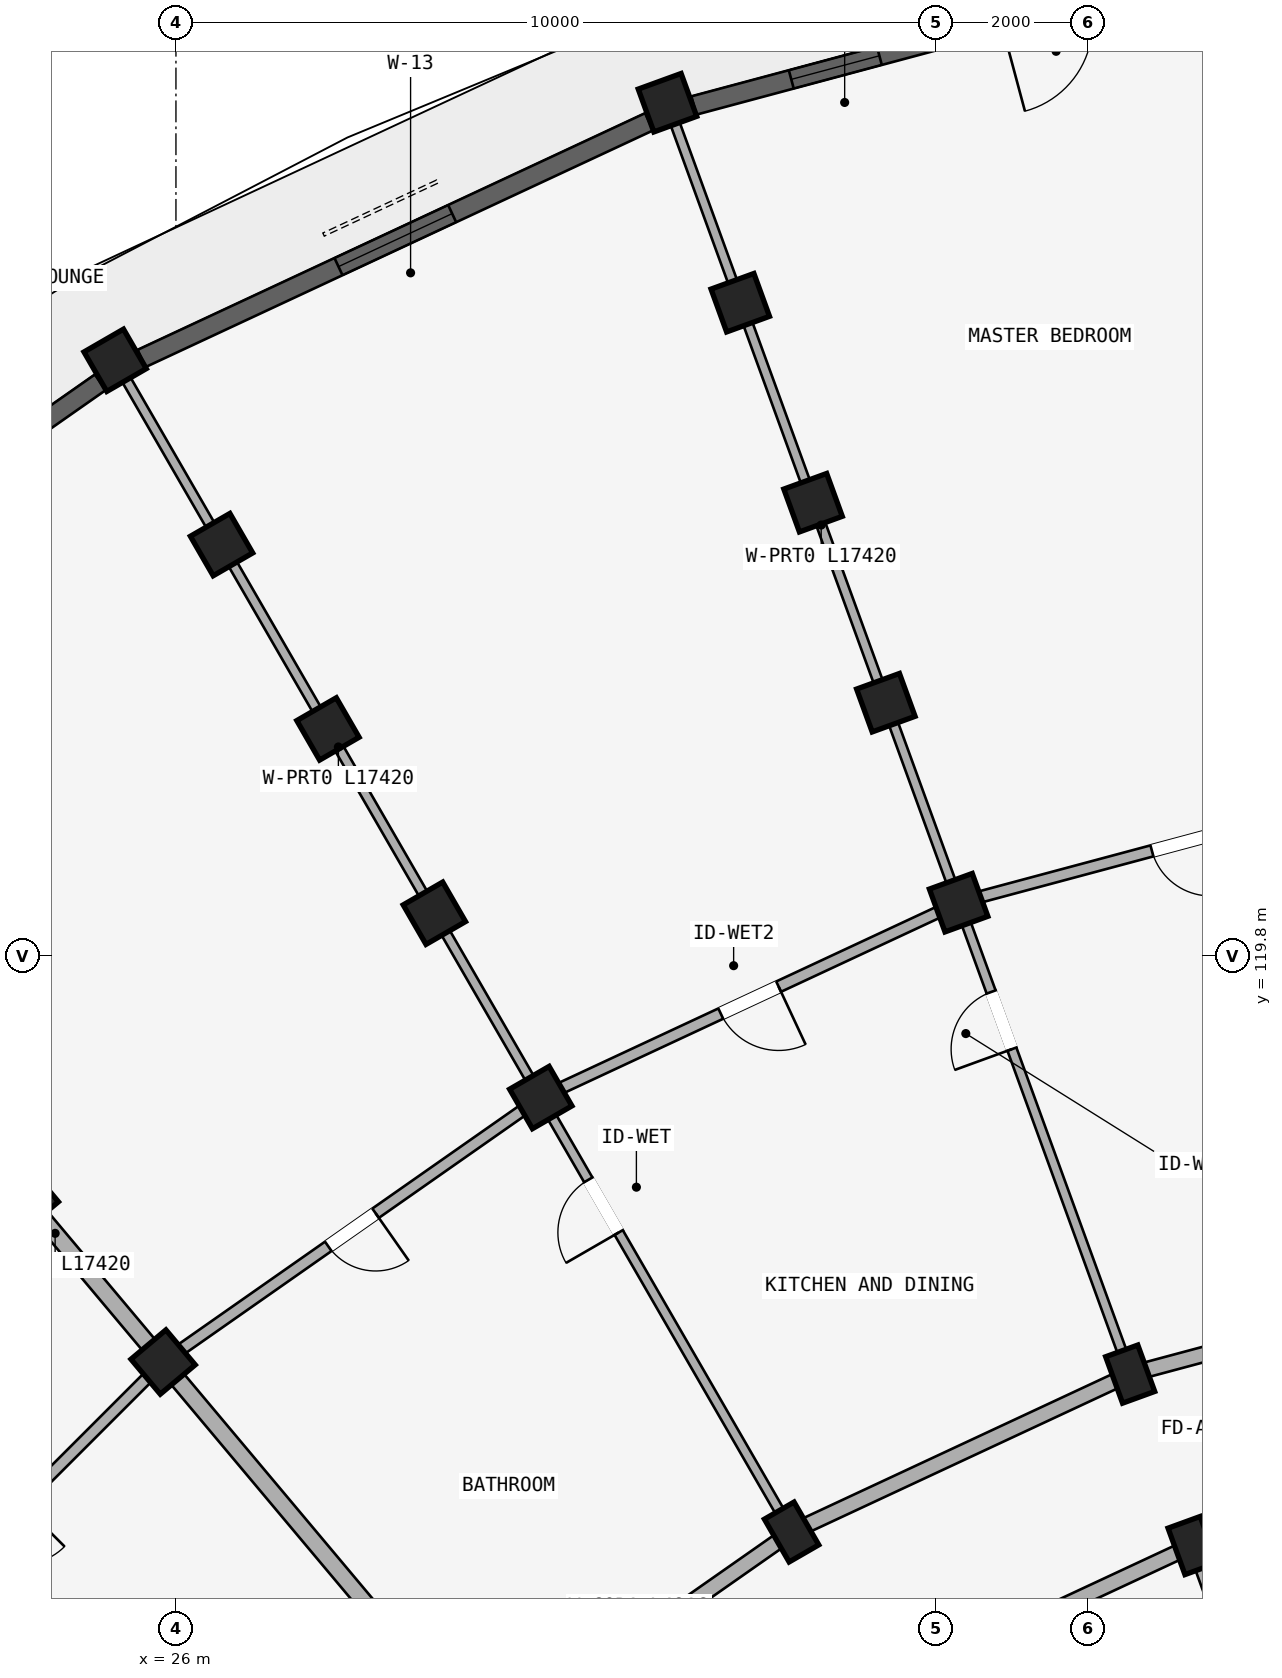
"""IFC4 building model, lengths in metres.
Left out: names, types, materials, properties, quantities, classifications, styles, units other than length and angle.
Written with IfcOpenShell. Run it as: python <this file> out.ifc"""

import sys

from ifc_helpers import new_model, si_unit, direction, frame, frame_2d, origin, origin_2d, place, context, subcontext, project, spatial, rectangle, extrude, element, fill, save


model = new_model("IFC4")
c1 = context("Model", 3, precision=1e-05, world=origin(), true_north=direction((0.0, 1.0)))
c2 = subcontext(c1, "Body", "Model", "MODEL_VIEW")
j1 = project(units=[si_unit("LENGTHUNIT", "METRE"), si_unit("PLANEANGLEUNIT", "RADIAN")], contexts=[c1])
p1 = place(None, origin())
s1 = spatial("IfcSite", under=j1, at=p1, CompositionType="ELEMENT")
p2 = place(p1, origin())
s2 = spatial("IfcBuilding", under=s1, at=p2, CompositionType="ELEMENT")
p3 = place(p2, frame((0.0, 0.0, 37.05)))
s3 = spatial("IfcBuildingStorey", under=s2, at=p3, CompositionType="ELEMENT", Elevation=37.05)
for number, where, z_axis, x_axis in (
    (1, (39.376, 112.044, 0.0), (0.0, 0.0, 1.0), (0.94, 0.342, 0.0)),
    (2, (38.555, 114.299, 0.0), (0.0, 0.0, 1.0), (0.94, 0.342, 0.0)),
):
    element("IfcColumn", number, at=place(p3, frame(where, z_axis=z_axis, x_axis=x_axis)), inside=s3, PredefinedType="COLUMN", context=c2, shape_type="SweptSolid", body=[
        extrude(rectangle(XDim=0.45, YDim=0.65, at=origin_2d()), origin(), (0.0, 0.0, 1.0), 2.93),
    ])
for number, where, z_axis, x_axis in (
    (3, (36.298, 120.501, 0.0), (0.0, 0.0, 1.0), (0.94, 0.342, 0.0)),
    (4, (35.34, 123.132, 0.0), (0.0, 0.0, 1.0), (0.94, 0.342, 0.0)),
    (5, (34.382, 125.764, 0.0), (0.0, 0.0, 1.0), (0.94, 0.342, 0.0)),
    (6, (33.425, 128.395, 0.0), (0.0, 0.0, 1.0), (0.94, 0.342, 0.0)),
):
    element("IfcColumn", number, at=place(p3, frame(where, z_axis=z_axis, x_axis=x_axis)), inside=s3, PredefinedType="COLUMN", context=c2, shape_type="SweptSolid", body=[
        extrude(rectangle(XDim=0.6, YDim=0.6, at=origin_2d()), origin(), (0.0, 0.0, 1.0), 2.93),
    ])
p4 = place(p3, frame((32.467, 131.026, 0.0), z_axis=(0.0, 0.0, 1.0), x_axis=(0.939692620786, 0.342020143326, 0.0)))
e7 = element("IfcColumn", 7, at=p4, inside=s3, PredefinedType="COLUMN", context=c2, shape_type="SweptSolid", body=[
    extrude(rectangle(XDim=0.6, YDim=0.6, at=origin_2d()), origin(), (0.0, 0.0, 1.0), 2.97),
])
p5 = place(p3, frame((34.1, 112.222, 0.0), z_axis=(0.0, 0.0, 1.0), x_axis=(0.866025403784, 0.5, 0.0)))
e8 = element("IfcColumn", 8, at=p5, inside=s3, PredefinedType="COLUMN", context=c2, shape_type="SweptSolid", body=[
    extrude(rectangle(XDim=0.45, YDim=0.65, at=origin_2d()), origin(), (0.0, 0.0, 1.0), 2.93),
])
for number, where, z_axis, x_axis in (
    (9, (30.8, 117.938, 0.0), (0.0, 0.0, 1.0), (0.866, 0.5, 0.0)),
    (10, (29.4, 120.363, 0.0), (0.0, 0.0, 1.0), (0.866, 0.5, 0.0)),
    (11, (28.0, 122.787, 0.0), (0.0, 0.0, 1.0), (0.866, 0.5, 0.0)),
    (12, (26.6, 125.212, 0.0), (0.0, 0.0, 1.0), (0.866, 0.5, 0.0)),
):
    element("IfcColumn", number, at=place(p3, frame(where, z_axis=z_axis, x_axis=x_axis)), inside=s3, PredefinedType="COLUMN", context=c2, shape_type="SweptSolid", body=[
        extrude(rectangle(XDim=0.6, YDim=0.6, at=origin_2d()), origin(), (0.0, 0.0, 1.0), 2.93),
    ])
p6 = place(p3, frame((25.2, 127.637, 0.0), z_axis=(0.0, 0.0, 1.0), x_axis=(0.866025403784, 0.5, 0.0)))
e13 = element("IfcColumn", 13, at=p6, inside=s3, PredefinedType="COLUMN", context=c2, shape_type="SweptSolid", body=[
    extrude(rectangle(XDim=0.6, YDim=0.6, at=origin_2d()), origin(), (0.0, 0.0, 1.0), 2.97),
])
for number, where, z_axis, x_axis in (
    (14, (25.831, 114.458, 0.0), (0.0, 0.0, 1.0), (0.766, 0.643, 0.0)),
    (15, (24.031, 116.603, 0.0), (0.0, 0.0, 1.0), (0.766, 0.643, 0.0)),
):
    element("IfcColumn", number, at=place(p3, frame(where, z_axis=z_axis, x_axis=x_axis)), inside=s3, PredefinedType="COLUMN", context=c2, shape_type="SweptSolid", body=[
        extrude(rectangle(XDim=0.6, YDim=0.6, at=origin_2d()), origin(), (0.0, 0.0, 1.0), 2.93),
    ])
p7 = place(p3, frame((43.72, 113.208, 0.0), z_axis=(0.0, 0.0, 1.0), x_axis=(-0.965934240054, -0.258787642463, 0.0)))
e16 = element("IfcWall", 16, at=p7, inside=s3, PredefinedType="STANDARD", context=c2, shape_type="SweptSolid", body=[
    extrude(rectangle(XDim=4.497, YDim=0.2, at=frame_2d((2.249, 0.0))), origin(), (0.0, 0.0, 1.0), 2.372),
])
p8 = place(p3, frame((43.303, 115.572, 0.0), z_axis=(0.0, 0.0, 1.0), x_axis=(-0.965930095386, -0.258803112091, 0.0)))
e17 = element("IfcWall", 17, at=p8, inside=s3, PredefinedType="STANDARD", context=c2, shape_type="SweptSolid", body=[
    extrude(rectangle(XDim=4.916, YDim=0.2, at=frame_2d((2.458, 0.0))), origin(), (0.0, 0.0, 1.0), 2.372),
])
p9 = place(p8, frame((1.918, 0.0, 0.0)))
e18 = element("IfcOpeningElement", 18, at=p9, cuts=e17, PredefinedType="OPENING", context=c2, shape_type="SweptSolid", body=[
    extrude(rectangle(XDim=1.08, YDim=2.15, at=frame_2d((0.54, 1.075))), frame((0.0, 0.11, 0.0), z_axis=(0.0, -1.0, 0.0), x_axis=(1.0, 0.0, 0.0)), (0.0, 0.0, 1.0), 0.22),
])
p10 = place(p3, frame((39.376, 112.044, 0.0), z_axis=(0.0, 0.0, 1.0), x_axis=(-0.906307919131, -0.422617978463, 0.0)))
e19 = element("IfcWall", 19, at=p10, inside=s3, PredefinedType="STANDARD", context=c2, shape_type="SweptSolid", body=[
    extrude(rectangle(XDim=4.497, YDim=0.2, at=frame_2d((2.249, 0.0))), origin(), (0.0, 0.0, 1.0), 2.372),
])
p11 = place(p3, frame((38.555, 114.299, 0.0), z_axis=(0.0, 0.0, 1.0), x_axis=(-0.906302381024, -0.422629854778, 0.0)))
e20 = element("IfcWall", 20, at=p11, inside=s3, PredefinedType="STANDARD", context=c2, shape_type="SweptSolid", body=[
    extrude(rectangle(XDim=4.915, YDim=0.2, at=frame_2d((2.458, 0.0))), origin(), (0.0, 0.0, 1.0), 2.372),
])
p12 = place(p3, frame((34.1, 112.222, 0.0), z_axis=(0.0, 0.0, 1.0), x_axis=(-0.819140911474, -0.573592335331, 0.0)))
e21 = element("IfcWall", 21, at=p12, inside=s3, PredefinedType="STANDARD", context=c2, shape_type="SweptSolid", body=[
    extrude(rectangle(XDim=4.916, YDim=0.2, at=frame_2d((2.458, 0.0))), origin(), (0.0, 0.0, 1.0), 2.372),
])
p13 = place(p3, frame((41.702, 105.654, 0.0), z_axis=(0.0, 0.0, 1.0), x_axis=(-0.342010221662, 0.939696231917, 0.0)))
e22 = element("IfcWall", 22, at=p13, inside=s3, PredefinedType="PARTITIONING", context=c2, shape_type="SweptSolid", body=[
    extrude(rectangle(XDim=6.75, YDim=0.15, at=frame_2d((3.375, 0.0))), origin(), (0.0, 0.0, 1.0), 2.372),
])
p14 = place(p13, frame((3.222, 0.0, 0.0)))
e23 = element("IfcOpeningElement", 23, at=p14, cuts=e22, PredefinedType="OPENING", context=c2, shape_type="SweptSolid", body=[
    extrude(rectangle(XDim=0.98, YDim=2.12, at=frame_2d((0.49, 1.06))), frame((0.0, 0.085, 0.0), z_axis=(0.0, -1.0, 0.0), x_axis=(1.0, 0.0, 0.0)), (0.0, 0.0, 1.0), 0.17),
])
p15 = place(p3, frame((38.521, 114.393, 0.0), z_axis=(0.0, 0.0, 1.0), x_axis=(-0.342022120477, 0.939691901159, 0.0)))
e24 = element("IfcWall", 24, at=p15, inside=s3, PredefinedType="PARTITIONING", context=c2, shape_type="SweptSolid", body=[
    extrude(rectangle(XDim=17.42, YDim=0.125, at=frame_2d((8.71, 0.0))), origin(), (0.0, 0.0, 1.0), 2.372),
])
p16 = place(p15, frame((4.45, 0.0, 0.0)))
e25 = element("IfcOpeningElement", 25, at=p16, cuts=e24, PredefinedType="OPENING", context=c2, shape_type="SweptSolid", body=[
    extrude(rectangle(XDim=0.8, YDim=2.1, at=frame_2d((0.4, 1.05))), frame((0.0, 0.073, 0.0), z_axis=(0.0, -1.0, 0.0), x_axis=(1.0, 0.0, 0.0)), (0.0, 0.0, 1.0), 0.145),
])
p17 = place(p3, frame((34.05, 112.309, 0.0), z_axis=(0.0, 0.0, 1.0), x_axis=(-0.499997843263, 0.866026648973, 0.0)))
e26 = element("IfcWall", 26, at=p17, inside=s3, PredefinedType="PARTITIONING", context=c2, shape_type="SweptSolid", body=[
    extrude(rectangle(XDim=17.42, YDim=0.125, at=frame_2d((8.71, 0.0))), origin(), (0.0, 0.0, 1.0), 2.372),
])
p18 = place(p17, frame((4.45, 0.0, 0.0)))
e27 = element("IfcOpeningElement", 27, at=p18, cuts=e26, PredefinedType="OPENING", context=c2, shape_type="SweptSolid", body=[
    extrude(rectangle(XDim=0.8, YDim=2.1, at=frame_2d((0.4, 1.05))), frame((0.0, 0.073, 0.0), z_axis=(0.0, -1.0, 0.0), x_axis=(1.0, 0.0, 0.0)), (0.0, 0.0, 1.0), 0.145),
])
p19 = place(p3, frame((30.009, 109.479, 0.0), z_axis=(0.0, 0.0, 1.0), x_axis=(-0.642784757967, 0.766046835987, 0.0)))
e28 = element("IfcWall", 28, at=p19, inside=s3, PredefinedType="STANDARD", context=c2, shape_type="SweptSolid", body=[
    extrude(rectangle(XDim=17.42, YDim=0.22, at=frame_2d((8.71, 0.0))), origin(), (0.0, 0.0, 1.0), 2.372),
])
p20 = place(p3, frame((26.521, 105.991, 0.0), z_axis=(0.0, 0.0, 1.0), x_axis=(-0.766046835987, 0.642784757967, 0.0)))
e29 = element("IfcWall", 29, at=p20, inside=s3, PredefinedType="PARTITIONING", context=c2, shape_type="SweptSolid", body=[
    extrude(rectangle(XDim=17.42, YDim=0.125, at=frame_2d((8.71, 0.0))), origin(), (0.0, 0.0, 1.0), 2.372),
])
p21 = place(p20, frame((4.45, 0.0, 0.0)))
e30 = element("IfcOpeningElement", 30, at=p21, cuts=e29, PredefinedType="OPENING", context=c2, shape_type="SweptSolid", body=[
    extrude(rectangle(XDim=0.8, YDim=2.1, at=frame_2d((0.4, 1.05))), frame((0.0, 0.073, 0.0), z_axis=(0.0, -1.0, 0.0), x_axis=(1.0, 0.0, 0.0)), (0.0, 0.0, 1.0), 0.145),
])
p22 = place(p3, frame((42.157, 122.071, 0.0), z_axis=(0.0, 0.0, 1.0), x_axis=(-0.965923618901, -0.258827283048, 0.0)))
e31 = element("IfcWall", 31, at=p22, inside=s3, PredefinedType="PLUMBINGWALL", context=c2, shape_type="SweptSolid", body=[
    extrude(rectangle(XDim=6.066, YDim=0.15, at=frame_2d((3.033, 0.0))), origin(), (0.0, 0.0, 1.0), 2.372),
])
p23 = place(p22, frame((2.633, 0.0, 0.0)))
e32 = element("IfcOpeningElement", 32, at=p23, cuts=e31, PredefinedType="OPENING", context=c2, shape_type="SweptSolid", body=[
    extrude(rectangle(XDim=0.8, YDim=2.1, at=frame_2d((0.4, 1.05))), frame((0.0, 0.085, 0.0), z_axis=(0.0, -1.0, 0.0), x_axis=(1.0, 0.0, 0.0)), (0.0, 0.0, 1.0), 0.17),
])
p24 = place(p3, frame((36.298, 120.501, 0.0), z_axis=(0.0, 0.0, 1.0), x_axis=(-0.906312656069, -0.42260781991, 0.0)))
e33 = element("IfcWall", 33, at=p24, inside=s3, PredefinedType="PLUMBINGWALL", context=c2, shape_type="SweptSolid", body=[
    extrude(rectangle(XDim=6.066, YDim=0.15, at=frame_2d((3.033, 0.0))), origin(), (0.0, 0.0, 1.0), 2.372),
])
p25 = place(p24, frame((2.613, 0.0, 0.0)))
e34 = element("IfcOpeningElement", 34, at=p25, cuts=e33, PredefinedType="OPENING", context=c2, shape_type="SweptSolid", body=[
    extrude(rectangle(XDim=0.84, YDim=2.1, at=frame_2d((0.42, 1.05))), frame((0.0, 0.085, 0.0), z_axis=(0.0, -1.0, 0.0), x_axis=(1.0, 0.0, 0.0)), (0.0, 0.0, 1.0), 0.17),
])
p26 = place(p3, frame((30.8, 117.938, 0.0), z_axis=(0.0, 0.0, 1.0), x_axis=(-0.81913926159, -0.573594691504, 0.0)))
e35 = element("IfcWall", 35, at=p26, inside=s3, PredefinedType="PLUMBINGWALL", context=c2, shape_type="SweptSolid", body=[
    extrude(rectangle(XDim=6.066, YDim=0.15, at=frame_2d((3.033, 0.0))), origin(), (0.0, 0.0, 1.0), 2.372),
])
p27 = place(p26, frame((2.653, 0.0, 0.0)))
e36 = element("IfcOpeningElement", 36, at=p27, cuts=e35, PredefinedType="OPENING", context=c2, shape_type="SweptSolid", body=[
    extrude(rectangle(XDim=0.76, YDim=2.05, at=frame_2d((0.38, 1.025))), frame((0.0, 0.085, 0.0), z_axis=(0.0, -1.0, 0.0), x_axis=(1.0, 0.0, 0.0)), (0.0, 0.0, 1.0), 0.17),
])
p28 = place(p3, frame((25.831, 114.458, 0.0), z_axis=(0.0, 0.0, 1.0), x_axis=(-0.707106781187, -0.707106781187, 0.0)))
e37 = element("IfcWall", 37, at=p28, inside=s3, PredefinedType="PLUMBINGWALL", context=c2, shape_type="SweptSolid", body=[
    extrude(rectangle(XDim=6.066, YDim=0.15, at=frame_2d((3.033, 0.0))), origin(), (0.0, 0.0, 1.0), 2.372),
])
p29 = place(p28, frame((2.633, 0.0, 0.0)))
e38 = element("IfcOpeningElement", 38, at=p29, cuts=e37, PredefinedType="OPENING", context=c2, shape_type="SweptSolid", body=[
    extrude(rectangle(XDim=0.8, YDim=2.1, at=frame_2d((0.4, 1.05))), frame((0.0, 0.085, 0.0), z_axis=(0.0, -1.0, 0.0), x_axis=(1.0, 0.0, 0.0)), (0.0, 0.0, 1.0), 0.17),
])
p30 = place(p3, frame((39.93, 132.896, 0.0), z_axis=(0.0, 0.0, 1.0), x_axis=(-0.965925122991, -0.258821669831, 0.0)))
e39 = element("IfcWall", 39, at=p30, inside=s3, PredefinedType="STANDARD", context=c2, shape_type="SweptSolid", body=[
    extrude(rectangle(XDim=7.367, YDim=0.25, at=frame_2d((3.684, 0.0))), origin(), (0.0, 0.0, 1.0), 2.412),
])
p31 = place(p30, frame((4.84, 0.0, 0.562)))
e40 = element("IfcOpeningElement", 40, at=p31, cuts=e39, PredefinedType="OPENING", context=c2, shape_type="SweptSolid", body=[
    extrude(rectangle(XDim=1.2, YDim=1.5, at=frame_2d((0.6, 0.75))), frame((0.0, 0.135, 0.0), z_axis=(0.0, -1.0, 0.0), x_axis=(1.0, 0.0, 0.0)), (0.0, 0.0, 1.0), 0.27),
])
p32 = place(p30, frame((1.979, 0.0, 0.0)))
e41 = element("IfcOpeningElement", 41, at=p32, cuts=e39, PredefinedType="OPENING", context=c2, shape_type="SweptSolid", body=[
    extrude(rectangle(XDim=1.2, YDim=2.15, at=frame_2d((0.6, 1.075))), frame((0.0, 0.135, 0.0), z_axis=(0.0, -1.0, 0.0), x_axis=(1.0, 0.0, 0.0)), (0.0, 0.0, 1.0), 0.27),
])
p33 = place(p3, frame((32.225, 130.775, 0.0), z_axis=(0.0, 0.0, 1.0), x_axis=(-0.906321090675, -0.422589730823, 0.0)))
e42 = element("IfcWall", 42, at=p33, inside=s3, PredefinedType="STANDARD", context=c2, shape_type="SweptSolid", body=[
    extrude(rectangle(XDim=7.367, YDim=0.25, at=frame_2d((3.684, 0.0))), origin(), (0.0, 0.0, 1.0), 2.412),
])
p34 = place(p33, frame((2.858, 0.0, 0.462)))
e43 = element("IfcOpeningElement", 43, at=p34, cuts=e42, PredefinedType="OPENING", context=c2, shape_type="SweptSolid", body=[
    extrude(rectangle(XDim=1.65, YDim=1.75, at=frame_2d((0.825, 0.875))), frame((0.0, 0.135, 0.0), z_axis=(0.0, -1.0, 0.0), x_axis=(1.0, 0.0, 0.0)), (0.0, 0.0, 1.0), 0.27),
])
p35 = place(p3, frame((25.005, 127.348, 0.0), z_axis=(0.0, 0.0, 1.0), x_axis=(-0.819147839112, -0.573582441919, 0.0)))
e44 = element("IfcWall", 44, at=p35, inside=s3, PredefinedType="STANDARD", context=c2, shape_type="SweptSolid", body=[
    extrude(rectangle(XDim=7.367, YDim=0.25, at=frame_2d((3.684, 0.0))), origin(), (0.0, 0.0, 1.0), 2.412),
])
p36 = place(p35, frame((2.783, 0.0, 0.562)))
e45 = element("IfcOpeningElement", 45, at=p36, cuts=e44, PredefinedType="OPENING", context=c2, shape_type="SweptSolid", body=[
    extrude(rectangle(XDim=1.8, YDim=1.65, at=frame_2d((0.9, 0.825))), frame((0.0, 0.135, 0.0), z_axis=(0.0, -1.0, 0.0), x_axis=(1.0, 0.0, 0.0)), (0.0, 0.0, 1.0), 0.27),
])
p37 = place(p31, origin())
e46 = element("IfcWindow", 46, at=p37, inside=s3, PartitioningType="SINGLE_PANEL", PredefinedType="WINDOW", context=c2, shape_type="SweptSolid", body=[
    extrude(rectangle(XDim=1.2, YDim=1.5, at=frame_2d((0.6, 0.75))), frame((0.0, 0.03, 0.0), z_axis=(0.0, -1.0, 0.0), x_axis=(1.0, 0.0, 0.0)), (0.0, 0.0, 1.0), 0.06),
])
fill(e40, e46)
p38 = place(p34, origin())
e47 = element("IfcWindow", 47, at=p38, inside=s3, PartitioningType="DOUBLE_PANEL_VERTICAL", PredefinedType="WINDOW", context=c2, shape_type="SweptSolid", body=[
    extrude(rectangle(XDim=1.65, YDim=1.75, at=frame_2d((0.825, 0.875))), frame((0.0, 0.03, 0.0), z_axis=(0.0, -1.0, 0.0), x_axis=(1.0, 0.0, 0.0)), (0.0, 0.0, 1.0), 0.06),
])
fill(e43, e47)
p39 = place(p16, frame((0.8, 0.0, 0.0), z_axis=(0.0, 0.0, 1.0), x_axis=(-1.0, 0.0, 0.0)))
e48 = element("IfcDoor", 48, at=p39, inside=s3, OperationType="SINGLE_SWING_RIGHT", PredefinedType="DOOR", context=c2, shape_type="SweptSolid", body=[
    extrude(rectangle(XDim=0.8, YDim=2.1, at=frame_2d((0.4, 1.05))), frame((0.0, 0.025, 0.0), z_axis=(0.0, -1.0, 0.0), x_axis=(1.0, 0.0, 0.0)), (0.0, 0.0, 1.0), 0.05),
])
fill(e25, e48)
p40 = place(p18, origin())
e49 = element("IfcDoor", 49, at=p40, inside=s3, OperationType="SINGLE_SWING_LEFT", PredefinedType="DOOR", context=c2, shape_type="SweptSolid", body=[
    extrude(rectangle(XDim=0.8, YDim=2.1, at=frame_2d((0.4, 1.05))), frame((0.0, 0.025, 0.0), z_axis=(0.0, -1.0, 0.0), x_axis=(1.0, 0.0, 0.0)), (0.0, 0.0, 1.0), 0.05),
])
fill(e27, e49)
p41 = place(p23, frame((0.8, 0.0, 0.0), z_axis=(0.0, 0.0, 1.0), x_axis=(-1.0, 0.0, 0.0)))
e50 = element("IfcDoor", 50, at=p41, inside=s3, OperationType="SINGLE_SWING_RIGHT", PredefinedType="DOOR", context=c2, shape_type="SweptSolid", body=[
    extrude(rectangle(XDim=0.8, YDim=2.1, at=frame_2d((0.4, 1.05))), frame((0.0, 0.025, 0.0), z_axis=(0.0, -1.0, 0.0), x_axis=(1.0, 0.0, 0.0)), (0.0, 0.0, 1.0), 0.05),
])
fill(e32, e50)
p42 = place(p25, origin())
e51 = element("IfcDoor", 51, at=p42, inside=s3, OperationType="SINGLE_SWING_LEFT", PredefinedType="DOOR", context=c2, shape_type="SweptSolid", body=[
    extrude(rectangle(XDim=0.84, YDim=2.1, at=frame_2d((0.42, 1.05))), frame((0.0, 0.025, 0.0), z_axis=(0.0, -1.0, 0.0), x_axis=(1.0, 0.0, 0.0)), (0.0, 0.0, 1.0), 0.05),
])
fill(e34, e51)
p43 = place(p27, frame((0.76, 0.0, 0.0), z_axis=(0.0, 0.0, 1.0), x_axis=(-1.0, 0.0, 0.0)))
e52 = element("IfcDoor", 52, at=p43, inside=s3, OperationType="SINGLE_SWING_RIGHT", PredefinedType="DOOR", context=c2, shape_type="SweptSolid", body=[
    extrude(rectangle(XDim=0.76, YDim=2.05, at=frame_2d((0.38, 1.025))), frame((0.0, 0.025, 0.0), z_axis=(0.0, -1.0, 0.0), x_axis=(1.0, 0.0, 0.0)), (0.0, 0.0, 1.0), 0.05),
])
fill(e36, e52)
save(model, sys.argv[1])
